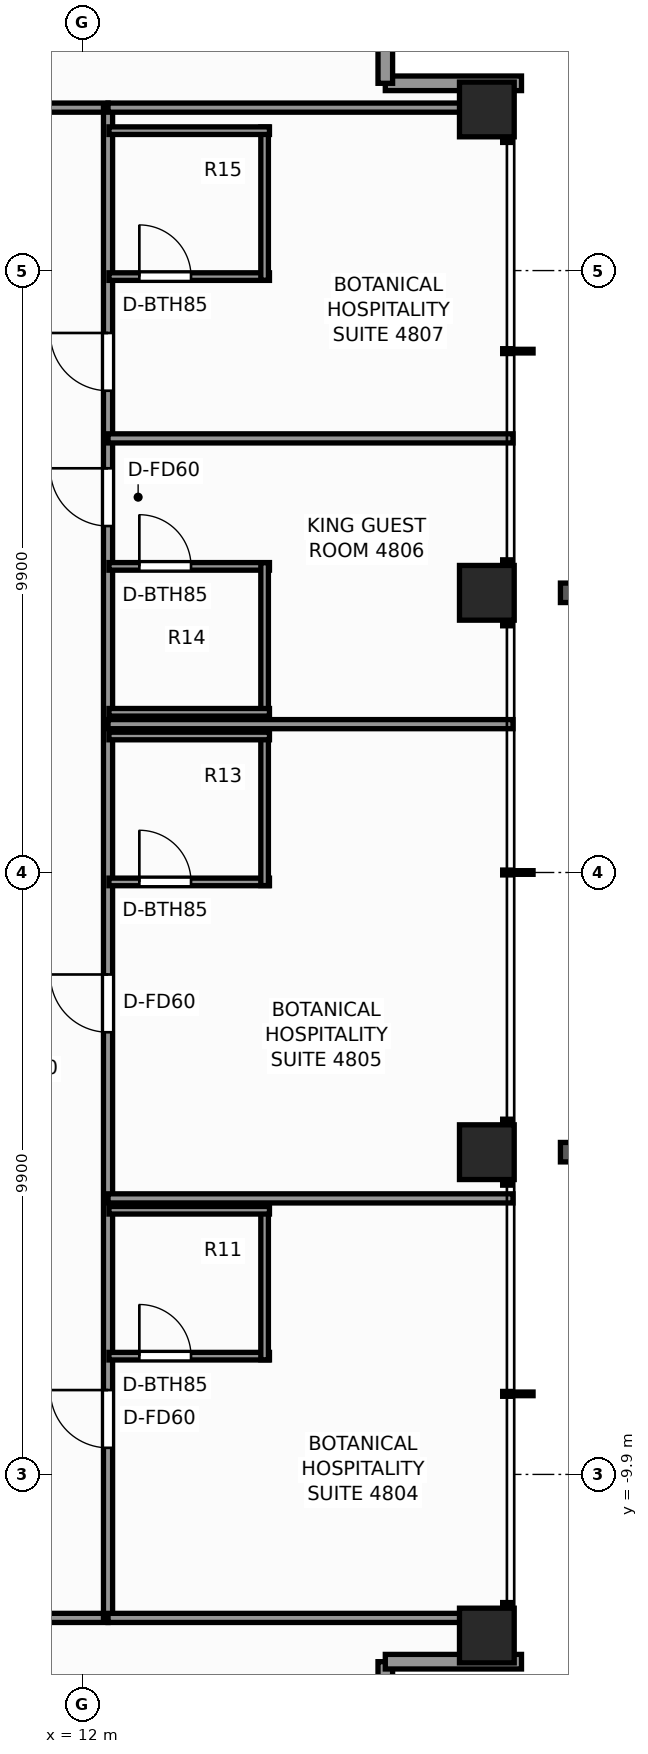
"""IFC4 building model, lengths in metres.
Left out: names, types, materials, properties, quantities, classifications, styles, units other than length and angle.
Written with IfcOpenShell. Run it as: python <this file> out.ifc"""

import sys

from ifc_helpers import new_model, si_unit, direction, frame, frame_2d, origin, origin_2d, place, context, subcontext, project, spatial, rectangle, extrude, element, fill, save


model = new_model("IFC4")
c1 = context("Model", 3, precision=1e-05, world=origin(), true_north=direction((0.0, 1.0)))
c2 = subcontext(c1, "Body", "Model", "MODEL_VIEW")
j1 = project(units=[si_unit("LENGTHUNIT", "METRE"), si_unit("PLANEANGLEUNIT", "RADIAN")], contexts=[c1])
p1 = place(None, origin())
s1 = spatial("IfcSite", under=j1, at=p1, CompositionType="ELEMENT")
p2 = place(p1, origin())
s2 = spatial("IfcBuilding", under=s1, at=p2, CompositionType="ELEMENT")
p3 = place(p2, frame((0.0, 0.0, 166.8)))
s3 = spatial("IfcBuildingStorey", under=s2, at=p3, CompositionType="ELEMENT", Elevation=166.8)
for number, where, z_axis, x_axis in (
    (1, (18.65, -12.55, 0.0), (0.0, 0.0, 1.0), (1.0, 0.0, 0.0)),
    (2, (18.65, -4.6, 0.0), (0.0, 0.0, 1.0), (1.0, 0.0, 0.0)),
    (3, (18.65, 4.6, 0.0), (0.0, 0.0, 1.0), (1.0, 0.0, 0.0)),
    (4, (18.65, 12.55, 0.0), (0.0, 0.0, 1.0), (1.0, 0.0, 0.0)),
):
    element("IfcColumn", number, at=place(p3, frame(where, z_axis=z_axis, x_axis=x_axis)), inside=s3, PredefinedType="COLUMN", context=c2, shape_type="SweptSolid", body=[
        extrude(rectangle(XDim=0.9, YDim=0.9, at=origin_2d()), origin(), (0.0, 0.0, 1.0), 3.3),
    ])
p4 = place(p3, frame((16.98, -12.98, 0.0), z_axis=(0.0, 0.0, 1.0), x_axis=(0.0, -1.0, 0.0)))
e5 = element("IfcWall", 5, at=p4, inside=s3, PredefinedType="STANDARD", context=c2, shape_type="SweptSolid", body=[
    extrude(rectangle(XDim=2.24, YDim=0.24, at=frame_2d((1.12, 0.0))), origin(), (0.0, 0.0, 1.0), 2.483),
])
p5 = place(p4, frame((0.45, 0.0, 0.65)))
e6 = element("IfcOpeningElement", 6, at=p5, cuts=e5, PredefinedType="OPENING", context=c2, shape_type="SweptSolid", body=[
    extrude(rectangle(XDim=1.1, YDim=1.45, at=frame_2d((0.55, 0.725))), frame((0.0, 0.13, 0.0), z_axis=(0.0, -1.0, 0.0), x_axis=(1.0, 0.0, 0.0)), (0.0, 0.0, 1.0), 0.26),
])
for number, where, z_axis, x_axis in (
    (7, (19.22, -12.98, 0.0), (0.0, 0.0, 1.0), (-1.0, 0.0, 0.0)),
    (8, (16.98, 12.98, 0.0), (0.0, 0.0, 1.0), (1.0, 0.0, 0.0)),
):
    element("IfcWall", number, at=place(p3, frame(where, z_axis=z_axis, x_axis=x_axis)), inside=s3, PredefinedType="STANDARD", context=c2, shape_type="SweptSolid", body=[
        extrude(rectangle(XDim=2.24, YDim=0.24, at=frame_2d((1.12, 0.0))), origin(), (0.0, 0.0, 1.0), 2.483),
    ])
p6 = place(p3, frame((16.98, 15.22, 0.0), z_axis=(0.0, 0.0, 1.0), x_axis=(0.0, -1.0, 0.0)))
e9 = element("IfcWall", 9, at=p6, inside=s3, PredefinedType="STANDARD", context=c2, shape_type="SweptSolid", body=[
    extrude(rectangle(XDim=2.24, YDim=0.24, at=frame_2d((1.12, 0.0))), origin(), (0.0, 0.0, 1.0), 2.483),
])
p7 = place(p6, frame((0.45, 0.0, 0.65)))
e10 = element("IfcOpeningElement", 10, at=p7, cuts=e9, PredefinedType="OPENING", context=c2, shape_type="SweptSolid", body=[
    extrude(rectangle(XDim=1.1, YDim=1.45, at=frame_2d((0.55, 0.725))), frame((0.0, 0.13, 0.0), z_axis=(0.0, -1.0, 0.0), x_axis=(1.0, 0.0, 0.0)), (0.0, 0.0, 1.0), 0.26),
])
p8 = place(p3, frame((-12.58, -12.26, 0.0), z_axis=(0.0, 0.0, 1.0), x_axis=(1.0, 0.0, 0.0)))
e11 = element("IfcWall", 11, at=p8, inside=s3, PredefinedType="PARTITIONING", context=c2, shape_type="SweptSolid", body=[
    extrude(rectangle(XDim=25.0, YDim=0.15, at=frame_2d((12.5, 0.0))), origin(), (0.0, 0.0, 1.0), 2.389),
])
p9 = place(p8, frame((3.379, 0.0, 0.0)))
e12 = element("IfcOpeningElement", 12, at=p9, cuts=e11, PredefinedType="OPENING", context=c2, shape_type="SweptSolid", body=[
    extrude(rectangle(XDim=0.9, YDim=2.06, at=frame_2d((0.45, 1.03))), frame((0.0, 0.085, 0.0), z_axis=(0.0, -1.0, 0.0), x_axis=(1.0, 0.0, 0.0)), (0.0, 0.0, 1.0), 0.17),
])
p10 = place(p8, frame((5.714, 0.0, 0.0)))
e13 = element("IfcOpeningElement", 13, at=p10, cuts=e11, PredefinedType="OPENING", context=c2, shape_type="SweptSolid", body=[
    extrude(rectangle(XDim=0.9, YDim=2.06, at=frame_2d((0.45, 1.03))), frame((0.0, 0.085, 0.0), z_axis=(0.0, -1.0, 0.0), x_axis=(1.0, 0.0, 0.0)), (0.0, 0.0, 1.0), 0.17),
])
p11 = place(p8, frame((8.985, 0.0, 0.0)))
e14 = element("IfcOpeningElement", 14, at=p11, cuts=e11, PredefinedType="OPENING", context=c2, shape_type="SweptSolid", body=[
    extrude(rectangle(XDim=0.9, YDim=2.06, at=frame_2d((0.45, 1.03))), frame((0.0, 0.085, 0.0), z_axis=(0.0, -1.0, 0.0), x_axis=(1.0, 0.0, 0.0)), (0.0, 0.0, 1.0), 0.17),
])
p12 = place(p8, frame((13.698, 0.0, 0.0)))
e15 = element("IfcOpeningElement", 15, at=p12, cuts=e11, PredefinedType="OPENING", context=c2, shape_type="SweptSolid", body=[
    extrude(rectangle(XDim=0.95, YDim=2.06, at=frame_2d((0.475, 1.03))), frame((0.0, 0.085, 0.0), z_axis=(0.0, -1.0, 0.0), x_axis=(1.0, 0.0, 0.0)), (0.0, 0.0, 1.0), 0.17),
])
p13 = place(p8, frame((19.665, 0.0, 0.0)))
e16 = element("IfcOpeningElement", 16, at=p13, cuts=e11, PredefinedType="OPENING", context=c2, shape_type="SweptSolid", body=[
    extrude(rectangle(XDim=0.9, YDim=2.06, at=frame_2d((0.45, 1.03))), frame((0.0, 0.085, 0.0), z_axis=(0.0, -1.0, 0.0), x_axis=(1.0, 0.0, 0.0)), (0.0, 0.0, 1.0), 0.17),
])
p14 = place(p3, frame((-12.58, 12.58, 0.0), z_axis=(0.0, 0.0, 1.0), x_axis=(1.0, 0.0, 0.0)))
e17 = element("IfcWall", 17, at=p14, inside=s3, PredefinedType="PARTITIONING", context=c2, shape_type="SweptSolid", body=[
    extrude(rectangle(XDim=25.0, YDim=0.15, at=frame_2d((12.5, 0.0))), origin(), (0.0, 0.0, 1.0), 2.389),
])
p15 = place(p14, frame((4.595, 0.0, 0.0)))
e18 = element("IfcOpeningElement", 18, at=p15, cuts=e17, PredefinedType="OPENING", context=c2, shape_type="SweptSolid", body=[
    extrude(rectangle(XDim=0.9, YDim=2.06, at=frame_2d((0.45, 1.03))), frame((0.0, 0.085, 0.0), z_axis=(0.0, -1.0, 0.0), x_axis=(1.0, 0.0, 0.0)), (0.0, 0.0, 1.0), 0.17),
])
p16 = place(p14, frame((19.64, 0.0, 0.0)))
e19 = element("IfcOpeningElement", 19, at=p16, cuts=e17, PredefinedType="OPENING", context=c2, shape_type="SweptSolid", body=[
    extrude(rectangle(XDim=0.95, YDim=2.06, at=frame_2d((0.475, 1.03))), frame((0.0, 0.085, 0.0), z_axis=(0.0, -1.0, 0.0), x_axis=(1.0, 0.0, 0.0)), (0.0, 0.0, 1.0), 0.17),
])
p17 = place(p3, frame((12.42, -12.26, 0.0), z_axis=(0.0, 0.0, 1.0), x_axis=(0.0, 1.0, 0.0)))
e20 = element("IfcWall", 20, at=p17, inside=s3, PredefinedType="PARTITIONING", context=c2, shape_type="SweptSolid", body=[
    extrude(rectangle(XDim=24.84, YDim=0.15, at=frame_2d((12.42, 0.0))), origin(), (0.0, 0.0, 1.0), 2.389),
])
p18 = place(p17, frame((2.798, 0.0, 0.0)))
e21 = element("IfcOpeningElement", 21, at=p18, cuts=e20, PredefinedType="OPENING", context=c2, shape_type="SweptSolid", body=[
    extrude(rectangle(XDim=0.95, YDim=2.06, at=frame_2d((0.475, 1.03))), frame((0.0, 0.085, 0.0), z_axis=(0.0, -1.0, 0.0), x_axis=(1.0, 0.0, 0.0)), (0.0, 0.0, 1.0), 0.17),
])
p19 = place(p17, frame((9.633, 0.0, 0.0)))
e22 = element("IfcOpeningElement", 22, at=p19, cuts=e20, PredefinedType="OPENING", context=c2, shape_type="SweptSolid", body=[
    extrude(rectangle(XDim=0.95, YDim=2.06, at=frame_2d((0.475, 1.03))), frame((0.0, 0.085, 0.0), z_axis=(0.0, -1.0, 0.0), x_axis=(1.0, 0.0, 0.0)), (0.0, 0.0, 1.0), 0.17),
])
p20 = place(p17, frame((17.958, 0.0, 0.0)))
e23 = element("IfcOpeningElement", 23, at=p20, cuts=e20, PredefinedType="OPENING", context=c2, shape_type="SweptSolid", body=[
    extrude(rectangle(XDim=0.95, YDim=2.06, at=frame_2d((0.475, 1.03))), frame((0.0, 0.085, 0.0), z_axis=(0.0, -1.0, 0.0), x_axis=(1.0, 0.0, 0.0)), (0.0, 0.0, 1.0), 0.17),
])
p21 = place(p17, frame((20.184, 0.0, 0.0)))
e24 = element("IfcOpeningElement", 24, at=p21, cuts=e20, PredefinedType="OPENING", context=c2, shape_type="SweptSolid", body=[
    extrude(rectangle(XDim=0.95, YDim=2.06, at=frame_2d((0.475, 1.03))), frame((0.0, 0.085, 0.0), z_axis=(0.0, -1.0, 0.0), x_axis=(1.0, 0.0, 0.0)), (0.0, 0.0, 1.0), 0.17),
])
for number, where, z_axis, x_axis in (
    (25, (12.42, -12.26, 0.0), (0.0, 0.0, 1.0), (1.0, 0.0, 0.0)),
    (26, (12.42, 12.58, 0.0), (0.0, 0.0, 1.0), (1.0, 0.0, 0.0)),
):
    element("IfcWall", number, at=place(p3, frame(where, z_axis=z_axis, x_axis=x_axis)), inside=s3, PredefinedType="PARTITIONING", context=c2, shape_type="SweptSolid", body=[
        extrude(rectangle(XDim=6.66, YDim=0.15, at=frame_2d((3.33, 0.0))), origin(), (0.0, 0.0, 1.0), 2.389),
    ])
p22 = place(p3, frame((12.42, -5.36, 0.0), z_axis=(0.0, 0.0, 1.0), x_axis=(1.0, 0.0, 0.0)))
e27 = element("IfcWall", 27, at=p22, inside=s3, PredefinedType="PARTITIONING", context=c2, shape_type="SweptSolid", body=[
    extrude(rectangle(XDim=6.66, YDim=0.15, at=frame_2d((3.33, 0.0))), origin(), (0.0, 0.0, 1.0), 2.473),
])
p23 = place(p3, frame((12.435, -7.955, 0.0), z_axis=(0.0, 0.0, 1.0), x_axis=(1.0, 0.0, 0.0)))
e28 = element("IfcWall", 28, at=p23, inside=s3, PredefinedType="PARTITIONING", context=c2, shape_type="SweptSolid", body=[
    extrude(rectangle(XDim=2.64, YDim=0.125, at=frame_2d((1.32, 0.0))), origin(), (0.0, 0.0, 1.0), 3.1),
])
p24 = place(p23, frame((0.5, 0.0, 0.0)))
e29 = element("IfcOpeningElement", 29, at=p24, cuts=e28, PredefinedType="OPENING", context=c2, shape_type="SweptSolid", body=[
    extrude(rectangle(XDim=0.85, YDim=2.03, at=frame_2d((0.425, 1.015))), frame((0.0, 0.073, 0.0), z_axis=(0.0, -1.0, 0.0), x_axis=(1.0, 0.0, 0.0)), (0.0, 0.0, 1.0), 0.145),
])
p25 = place(p3, frame((14.995, -8.015, 0.0), z_axis=(0.0, 0.0, 1.0), x_axis=(0.0, 1.0, 0.0)))
e30 = element("IfcWall", 30, at=p25, inside=s3, PredefinedType="PARTITIONING", context=c2, shape_type="SweptSolid", body=[
    extrude(rectangle(XDim=2.52, YDim=0.125, at=frame_2d((1.26, 0.0))), origin(), (0.0, 0.0, 1.0), 3.1),
])
p26 = place(p3, frame((12.435, -5.555, 0.0), z_axis=(0.0, 0.0, 1.0), x_axis=(1.0, 0.0, 0.0)))
e31 = element("IfcWall", 31, at=p26, inside=s3, PredefinedType="PARTITIONING", context=c2, shape_type="SweptSolid", body=[
    extrude(rectangle(XDim=2.64, YDim=0.125, at=frame_2d((1.32, 0.0))), origin(), (0.0, 0.0, 1.0), 3.1),
])
p27 = place(p3, frame((12.42, 2.44, 0.0), z_axis=(0.0, 0.0, 1.0), x_axis=(1.0, 0.0, 0.0)))
e32 = element("IfcWall", 32, at=p27, inside=s3, PredefinedType="PARTITIONING", context=c2, shape_type="SweptSolid", body=[
    extrude(rectangle(XDim=6.66, YDim=0.15, at=frame_2d((3.33, 0.0))), origin(), (0.0, 0.0, 1.0), 2.473),
])
p28 = place(p3, frame((12.435, -0.155, 0.0), z_axis=(0.0, 0.0, 1.0), x_axis=(1.0, 0.0, 0.0)))
e33 = element("IfcWall", 33, at=p28, inside=s3, PredefinedType="PARTITIONING", context=c2, shape_type="SweptSolid", body=[
    extrude(rectangle(XDim=2.64, YDim=0.125, at=frame_2d((1.32, 0.0))), origin(), (0.0, 0.0, 1.0), 2.625),
])
p29 = place(p28, frame((0.5, 0.0, 0.0)))
e34 = element("IfcOpeningElement", 34, at=p29, cuts=e33, PredefinedType="OPENING", context=c2, shape_type="SweptSolid", body=[
    extrude(rectangle(XDim=0.85, YDim=2.03, at=frame_2d((0.425, 1.015))), frame((0.0, 0.073, 0.0), z_axis=(0.0, -1.0, 0.0), x_axis=(1.0, 0.0, 0.0)), (0.0, 0.0, 1.0), 0.145),
])
p30 = place(p3, frame((14.995, -0.215, 0.0), z_axis=(0.0, 0.0, 1.0), x_axis=(0.0, 1.0, 0.0)))
e35 = element("IfcWall", 35, at=p30, inside=s3, PredefinedType="PARTITIONING", context=c2, shape_type="SweptSolid", body=[
    extrude(rectangle(XDim=2.52, YDim=0.125, at=frame_2d((1.26, 0.0))), origin(), (0.0, 0.0, 1.0), 2.625),
])
p31 = place(p3, frame((12.435, 2.245, 0.0), z_axis=(0.0, 0.0, 1.0), x_axis=(1.0, 0.0, 0.0)))
e36 = element("IfcWall", 36, at=p31, inside=s3, PredefinedType="PARTITIONING", context=c2, shape_type="SweptSolid", body=[
    extrude(rectangle(XDim=2.64, YDim=0.125, at=frame_2d((1.32, 0.0))), origin(), (0.0, 0.0, 1.0), 3.1),
])
p32 = place(p3, frame((12.42, 7.14, 0.0), z_axis=(0.0, 0.0, 1.0), x_axis=(1.0, 0.0, 0.0)))
e37 = element("IfcWall", 37, at=p32, inside=s3, PredefinedType="PARTITIONING", context=c2, shape_type="SweptSolid", body=[
    extrude(rectangle(XDim=6.66, YDim=0.15, at=frame_2d((3.33, 0.0))), origin(), (0.0, 0.0, 1.0), 2.473),
])
p33 = place(p3, frame((12.435, 5.035, 0.0), z_axis=(0.0, 0.0, 1.0), x_axis=(1.0, 0.0, 0.0)))
e38 = element("IfcWall", 38, at=p33, inside=s3, PredefinedType="PARTITIONING", context=c2, shape_type="SweptSolid", body=[
    extrude(rectangle(XDim=2.64, YDim=0.125, at=frame_2d((1.32, 0.0))), origin(), (0.0, 0.0, 1.0), 3.1),
])
p34 = place(p33, frame((0.5, 0.0, 0.0)))
e39 = element("IfcOpeningElement", 39, at=p34, cuts=e38, PredefinedType="OPENING", context=c2, shape_type="SweptSolid", body=[
    extrude(rectangle(XDim=0.85, YDim=2.03, at=frame_2d((0.425, 1.015))), frame((0.0, 0.073, 0.0), z_axis=(0.0, -1.0, 0.0), x_axis=(1.0, 0.0, 0.0)), (0.0, 0.0, 1.0), 0.145),
])
p35 = place(p3, frame((14.995, 2.575, 0.0), z_axis=(0.0, 0.0, 1.0), x_axis=(0.0, 1.0, 0.0)))
e40 = element("IfcWall", 40, at=p35, inside=s3, PredefinedType="PARTITIONING", context=c2, shape_type="SweptSolid", body=[
    extrude(rectangle(XDim=2.52, YDim=0.125, at=frame_2d((1.26, 0.0))), origin(), (0.0, 0.0, 1.0), 2.389),
])
p36 = place(p3, frame((12.435, 2.635, 0.0), z_axis=(0.0, 0.0, 1.0), x_axis=(1.0, 0.0, 0.0)))
e41 = element("IfcWall", 41, at=p36, inside=s3, PredefinedType="PARTITIONING", context=c2, shape_type="SweptSolid", body=[
    extrude(rectangle(XDim=2.64, YDim=0.125, at=frame_2d((1.32, 0.0))), origin(), (0.0, 0.0, 1.0), 3.1),
])
p37 = place(p3, frame((12.435, 9.801, 0.0), z_axis=(0.0, 0.0, 1.0), x_axis=(1.0, 0.0, 0.0)))
e42 = element("IfcWall", 42, at=p37, inside=s3, PredefinedType="PARTITIONING", context=c2, shape_type="SweptSolid", body=[
    extrude(rectangle(XDim=2.64, YDim=0.125, at=frame_2d((1.32, 0.0))), origin(), (0.0, 0.0, 1.0), 3.1),
])
p38 = place(p37, frame((0.5, 0.0, 0.0)))
e43 = element("IfcOpeningElement", 43, at=p38, cuts=e42, PredefinedType="OPENING", context=c2, shape_type="SweptSolid", body=[
    extrude(rectangle(XDim=0.85, YDim=2.03, at=frame_2d((0.425, 1.015))), frame((0.0, 0.073, 0.0), z_axis=(0.0, -1.0, 0.0), x_axis=(1.0, 0.0, 0.0)), (0.0, 0.0, 1.0), 0.145),
])
p39 = place(p3, frame((14.995, 9.741, 0.0), z_axis=(0.0, 0.0, 1.0), x_axis=(0.0, 1.0, 0.0)))
e44 = element("IfcWall", 44, at=p39, inside=s3, PredefinedType="PARTITIONING", context=c2, shape_type="SweptSolid", body=[
    extrude(rectangle(XDim=2.52, YDim=0.125, at=frame_2d((1.26, 0.0))), origin(), (0.0, 0.0, 1.0), 2.389),
])
p40 = place(p3, frame((12.435, 12.201, 0.0), z_axis=(0.0, 0.0, 1.0), x_axis=(1.0, 0.0, 0.0)))
e45 = element("IfcWall", 45, at=p40, inside=s3, PredefinedType="PARTITIONING", context=c2, shape_type="SweptSolid", body=[
    extrude(rectangle(XDim=2.64, YDim=0.125, at=frame_2d((1.32, 0.0))), origin(), (0.0, 0.0, 1.0), 3.1),
])
p41 = place(p24, origin())
e46 = element("IfcDoor", 46, at=p41, inside=s3, OperationType="SINGLE_SWING_LEFT", PredefinedType="DOOR", context=c2, shape_type="SweptSolid", body=[
    extrude(rectangle(XDim=0.85, YDim=2.03, at=frame_2d((0.425, 1.015))), frame((0.0, 0.025, 0.0), z_axis=(0.0, -1.0, 0.0), x_axis=(1.0, 0.0, 0.0)), (0.0, 0.0, 1.0), 0.05),
])
fill(e29, e46)
p42 = place(p18, origin())
e47 = element("IfcDoor", 47, at=p42, inside=s3, OperationType="SINGLE_SWING_RIGHT", PredefinedType="DOOR", context=c2, shape_type="SweptSolid", body=[
    extrude(rectangle(XDim=0.95, YDim=2.06, at=frame_2d((0.475, 1.03))), frame((0.0, 0.025, 0.0), z_axis=(0.0, -1.0, 0.0), x_axis=(1.0, 0.0, 0.0)), (0.0, 0.0, 1.0), 0.05),
])
fill(e21, e47)
p43 = place(p29, origin())
e48 = element("IfcDoor", 48, at=p43, inside=s3, OperationType="SINGLE_SWING_LEFT", PredefinedType="DOOR", context=c2, shape_type="SweptSolid", body=[
    extrude(rectangle(XDim=0.85, YDim=2.03, at=frame_2d((0.425, 1.015))), frame((0.0, 0.025, 0.0), z_axis=(0.0, -1.0, 0.0), x_axis=(1.0, 0.0, 0.0)), (0.0, 0.0, 1.0), 0.05),
])
fill(e34, e48)
p44 = place(p19, origin())
e49 = element("IfcDoor", 49, at=p44, inside=s3, OperationType="SINGLE_SWING_RIGHT", PredefinedType="DOOR", context=c2, shape_type="SweptSolid", body=[
    extrude(rectangle(XDim=0.95, YDim=2.06, at=frame_2d((0.475, 1.03))), frame((0.0, 0.025, 0.0), z_axis=(0.0, -1.0, 0.0), x_axis=(1.0, 0.0, 0.0)), (0.0, 0.0, 1.0), 0.05),
])
fill(e22, e49)
p45 = place(p34, origin())
e50 = element("IfcDoor", 50, at=p45, inside=s3, OperationType="SINGLE_SWING_LEFT", PredefinedType="DOOR", context=c2, shape_type="SweptSolid", body=[
    extrude(rectangle(XDim=0.85, YDim=2.03, at=frame_2d((0.425, 1.015))), frame((0.0, 0.025, 0.0), z_axis=(0.0, -1.0, 0.0), x_axis=(1.0, 0.0, 0.0)), (0.0, 0.0, 1.0), 0.05),
])
fill(e39, e50)
p46 = place(p20, origin())
e51 = element("IfcDoor", 51, at=p46, inside=s3, OperationType="SINGLE_SWING_RIGHT", PredefinedType="DOOR", context=c2, shape_type="SweptSolid", body=[
    extrude(rectangle(XDim=0.95, YDim=2.06, at=frame_2d((0.475, 1.03))), frame((0.0, 0.025, 0.0), z_axis=(0.0, -1.0, 0.0), x_axis=(1.0, 0.0, 0.0)), (0.0, 0.0, 1.0), 0.05),
])
fill(e23, e51)
p47 = place(p38, origin())
e52 = element("IfcDoor", 52, at=p47, inside=s3, OperationType="SINGLE_SWING_LEFT", PredefinedType="DOOR", context=c2, shape_type="SweptSolid", body=[
    extrude(rectangle(XDim=0.85, YDim=2.03, at=frame_2d((0.425, 1.015))), frame((0.0, 0.025, 0.0), z_axis=(0.0, -1.0, 0.0), x_axis=(1.0, 0.0, 0.0)), (0.0, 0.0, 1.0), 0.05),
])
fill(e43, e52)
p48 = place(p21, origin())
e53 = element("IfcDoor", 53, at=p48, inside=s3, OperationType="SINGLE_SWING_RIGHT", PredefinedType="DOOR", context=c2, shape_type="SweptSolid", body=[
    extrude(rectangle(XDim=0.95, YDim=2.06, at=frame_2d((0.475, 1.03))), frame((0.0, 0.025, 0.0), z_axis=(0.0, -1.0, 0.0), x_axis=(1.0, 0.0, 0.0)), (0.0, 0.0, 1.0), 0.05),
])
fill(e24, e53)
save(model, sys.argv[1])
